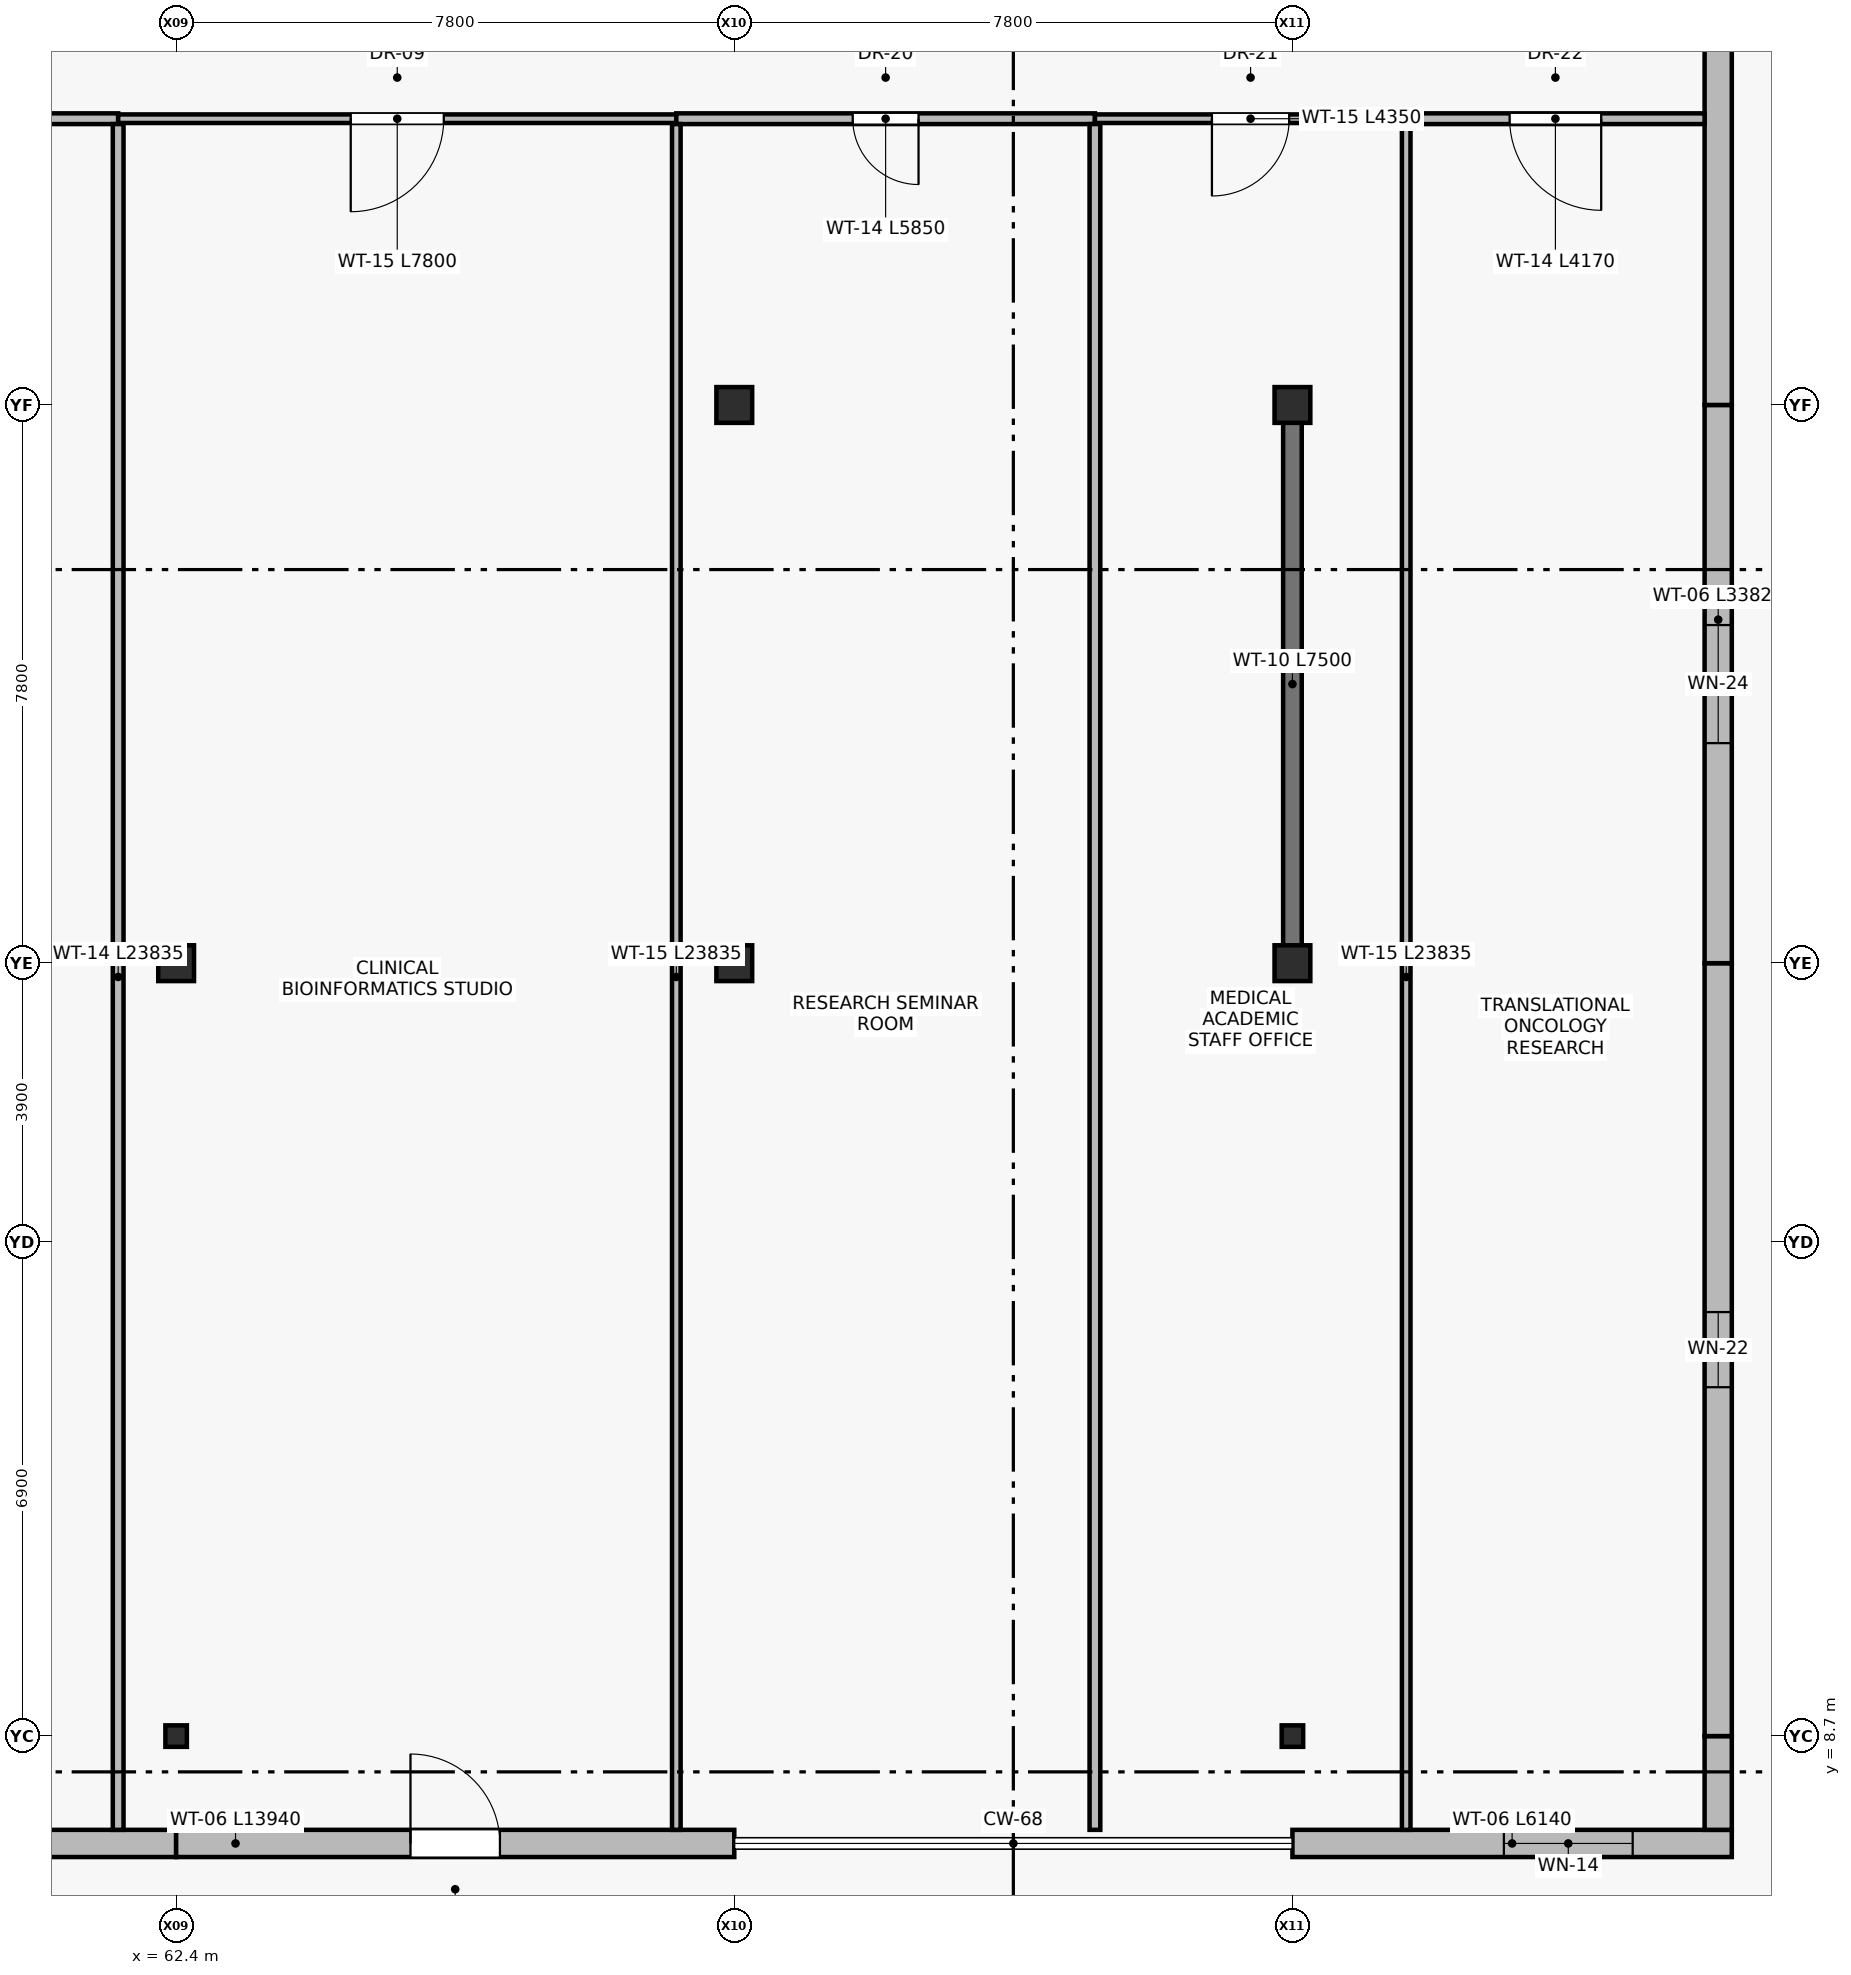
"""IFC4 building model, lengths in metres.
Left out: names, types, materials, properties, quantities, classifications, styles, units other than length and angle.
Written with IfcOpenShell. Run it as: python <this file> out.ifc"""

import sys

from ifc_helpers import new_model, si_unit, direction, frame, frame_2d, origin, origin_2d, place, context, subcontext, project, spatial, rectangle, i_section, extrude, element, fill, save


model = new_model("IFC4")
c1 = context("Model", 3, precision=1e-05, world=origin(), true_north=direction((0.0, 1.0)))
c2 = subcontext(c1, "Body", "Model", "MODEL_VIEW")
j1 = project(units=[si_unit("LENGTHUNIT", "METRE"), si_unit("PLANEANGLEUNIT", "RADIAN")], contexts=[c1])
p1 = place(None, origin())
s1 = spatial("IfcSite", under=j1, at=p1, CompositionType="ELEMENT")
p2 = place(p1, origin())
s2 = spatial("IfcBuilding", under=s1, at=p2, CompositionType="ELEMENT")
p3 = place(p2, frame((0.0, 0.0, 14.1)))
s3 = spatial("IfcBuildingStorey", under=s2, at=p3, CompositionType="ELEMENT", Elevation=14.1)
for number, where, z_axis, x_axis in (
    (1, (62.4, 19.5, 0.0), (0.0, 0.0, 1.0), (1.0, 0.0, 0.0)),
    (2, (70.2, 19.5, 0.0), (0.0, 0.0, 1.0), (1.0, 0.0, 0.0)),
    (3, (70.2, 27.3, 0.0), (0.0, 0.0, 1.0), (1.0, 0.0, 0.0)),
    (4, (78.0, 19.5, 0.0), (0.0, 0.0, 1.0), (1.0, 0.0, 0.0)),
    (5, (78.0, 27.3, 0.0), (0.0, 0.0, 1.0), (1.0, 0.0, 0.0)),
):
    element("IfcColumn", number, at=place(p3, frame(where, z_axis=z_axis, x_axis=x_axis)), inside=s3, PredefinedType="COLUMN", context=c2, shape_type="SweptSolid", body=[
        extrude(rectangle(XDim=0.5, YDim=0.5, at=origin_2d()), origin(), (0.0, 0.0, 1.0), 4.5),
    ])
for number, where, z_axis, x_axis in (
    (6, (62.4, 8.7, 0.0), (0.0, 0.0, 1.0), (1.0, 0.0, 0.0)),
    (7, (78.0, 8.7, 0.0), (0.0, 0.0, 1.0), (1.0, 0.0, 0.0)),
):
    element("IfcColumn", number, at=place(p3, frame(where, z_axis=z_axis, x_axis=x_axis)), inside=s3, PredefinedType="COLUMN", context=c2, shape_type="SweptSolid", body=[
        extrude(i_section(OverallWidth=0.3, OverallDepth=0.3, WebThickness=0.011, FlangeThickness=0.019, at=origin_2d()), origin(), (0.0, 0.0, 1.0), 4.5),
    ])
p4 = place(p3, frame((62.4, 7.2, 0.0), z_axis=(0.0, 0.0, 1.0), x_axis=(-1.0, 0.0, 0.0)))
e8 = element("IfcWall", 8, at=p4, inside=s3, PredefinedType="STANDARD", context=c2, shape_type="SweptSolid", body=[
    extrude(rectangle(XDim=6.14, YDim=0.38, at=frame_2d((3.07, 0.0))), origin(), (0.0, 0.0, 1.0), 4.24),
])
p5 = place(p4, frame((2.715, 0.0, 0.9)))
e9 = element("IfcOpeningElement", 9, at=p5, cuts=e8, PredefinedType="OPENING", context=c2, shape_type="SweptSolid", body=[
    extrude(rectangle(XDim=1.5, YDim=2.2, at=frame_2d((0.75, 1.1))), frame((0.0, 0.2, 0.0), z_axis=(0.0, -1.0, 0.0), x_axis=(1.0, 0.0, 0.0)), (0.0, 0.0, 1.0), 0.4),
])
p6 = place(p3, frame((70.2, 7.2, 0.0), z_axis=(0.0, 0.0, 1.0), x_axis=(-1.0, 0.0, 0.0)))
e10 = element("IfcWall", 10, at=p6, inside=s3, PredefinedType="STANDARD", context=c2, shape_type="SweptSolid", body=[
    extrude(rectangle(XDim=7.8, YDim=0.38, at=frame_2d((3.9, 0.0))), origin(), (0.0, 0.0, 1.0), 4.24),
])
p7 = place(p6, frame((3.275, 0.0, 0.0)))
e11 = element("IfcOpeningElement", 11, at=p7, cuts=e10, PredefinedType="OPENING", context=c2, shape_type="SweptSolid", body=[
    extrude(rectangle(XDim=1.25, YDim=2.2, at=frame_2d((0.625, 1.1))), frame((0.0, 0.2, 0.0), z_axis=(0.0, -1.0, 0.0), x_axis=(1.0, 0.0, 0.0)), (0.0, 0.0, 1.0), 0.4),
])
p8 = place(p3, frame((84.14, 7.2, 0.0), z_axis=(0.0, 0.0, 1.0), x_axis=(-1.0, 0.0, 0.0)))
e12 = element("IfcWall", 12, at=p8, inside=s3, PredefinedType="STANDARD", context=c2, shape_type="SweptSolid", body=[
    extrude(rectangle(XDim=6.14, YDim=0.38, at=frame_2d((3.07, 0.0))), origin(), (0.0, 0.0, 1.0), 4.24),
])
p9 = place(p8, frame((1.385, 0.0, 0.9)))
e13 = element("IfcOpeningElement", 13, at=p9, cuts=e12, PredefinedType="OPENING", context=c2, shape_type="SweptSolid", body=[
    extrude(rectangle(XDim=1.8, YDim=2.2, at=frame_2d((0.9, 1.1))), frame((0.0, 0.2, 0.0), z_axis=(0.0, -1.0, 0.0), x_axis=(1.0, 0.0, 0.0)), (0.0, 0.0, 1.0), 0.4),
])
p10 = place(p3, frame((83.95, 8.7, 0.0), z_axis=(0.0, 0.0, 1.0), x_axis=(0.0, -1.0, 0.0)))
e14 = element("IfcWall", 14, at=p10, inside=s3, PredefinedType="STANDARD", context=c2, shape_type="SweptSolid", body=[
    extrude(rectangle(XDim=1.31, YDim=0.38, at=frame_2d((0.655, 0.0))), origin(), (0.0, 0.0, 1.0), 4.24),
])
p11 = place(p3, frame((83.95, 19.5, 0.0), z_axis=(0.0, 0.0, 1.0), x_axis=(0.0, -1.0, 0.0)))
e15 = element("IfcWall", 15, at=p11, inside=s3, PredefinedType="STANDARD", context=c2, shape_type="SweptSolid", body=[
    extrude(rectangle(XDim=10.8, YDim=0.38, at=frame_2d((5.4, 0.0))), origin(), (0.0, 0.0, 1.0), 4.24),
])
p12 = place(p11, frame((4.875, 0.0, 0.9)))
e16 = element("IfcOpeningElement", 16, at=p12, cuts=e15, PredefinedType="OPENING", context=c2, shape_type="SweptSolid", body=[
    extrude(rectangle(XDim=1.05, YDim=2.05, at=frame_2d((0.525, 1.025))), frame((0.0, 0.2, 0.0), z_axis=(0.0, -1.0, 0.0), x_axis=(1.0, 0.0, 0.0)), (0.0, 0.0, 1.0), 0.4),
])
p13 = place(p3, frame((83.95, 27.3, 0.0), z_axis=(0.0, 0.0, 1.0), x_axis=(0.0, -1.0, 0.0)))
e17 = element("IfcWall", 17, at=p13, inside=s3, PredefinedType="STANDARD", context=c2, shape_type="SweptSolid", body=[
    extrude(rectangle(XDim=7.8, YDim=0.38, at=frame_2d((3.9, 0.0))), origin(), (0.0, 0.0, 1.0), 4.24),
])
p14 = place(p13, frame((3.075, 0.0, 0.9)))
e18 = element("IfcOpeningElement", 18, at=p14, cuts=e17, PredefinedType="OPENING", context=c2, shape_type="SweptSolid", body=[
    extrude(rectangle(XDim=1.65, YDim=1.5, at=frame_2d((0.825, 0.75))), frame((0.0, 0.2, 0.0), z_axis=(0.0, -1.0, 0.0), x_axis=(1.0, 0.0, 0.0)), (0.0, 0.0, 1.0), 0.4),
])
p15 = place(p3, frame((83.95, 35.1, 0.0), z_axis=(0.0, 0.0, 1.0), x_axis=(0.0, -1.0, 0.0)))
e19 = element("IfcWall", 19, at=p15, inside=s3, PredefinedType="STANDARD", context=c2, shape_type="SweptSolid", body=[
    extrude(rectangle(XDim=7.8, YDim=0.38, at=frame_2d((3.9, 0.0))), origin(), (0.0, 0.0, 1.0), 4.24),
])
p16 = place(p15, frame((1.525, 0.0, 0.0)))
e20 = element("IfcOpeningElement", 20, at=p16, cuts=e19, PredefinedType="OPENING", context=c2, shape_type="SweptSolid", body=[
    extrude(rectangle(XDim=1.25, YDim=2.2, at=frame_2d((0.625, 1.1))), frame((0.0, 0.2, 0.0), z_axis=(0.0, -1.0, 0.0), x_axis=(1.0, 0.0, 0.0)), (0.0, 0.0, 1.0), 0.4),
])
p17 = place(p3, frame((78.0, 19.65, 0.0), z_axis=(0.0, 0.0, 1.0), x_axis=(0.0, 1.0, 0.0)))
e21 = element("IfcWall", 21, at=p17, inside=s3, PredefinedType="SHEAR", context=c2, shape_type="SweptSolid", body=[
    extrude(rectangle(XDim=7.5, YDim=0.26, at=frame_2d((3.75, 0.0))), origin(), (0.0, 0.0, 1.0), 4.24),
])
p18 = place(p3, frame((61.59, 31.3, 0.0), z_axis=(0.0, 0.0, 1.0), x_axis=(-1.0, 0.0, 0.0)))
e22 = element("IfcWall", 22, at=p18, inside=s3, PredefinedType="PARTITIONING", context=c2, shape_type="SweptSolid", body=[
    extrude(rectangle(XDim=4.95, YDim=0.15, at=frame_2d((2.475, 0.0))), origin(), (0.0, 0.0, 1.0), 4.24),
])
p19 = place(p18, frame((1.875, 0.0, 0.0)))
e23 = element("IfcOpeningElement", 23, at=p19, cuts=e22, PredefinedType="OPENING", context=c2, shape_type="SweptSolid", body=[
    extrude(rectangle(XDim=1.2, YDim=2.2, at=frame_2d((0.6, 1.1))), frame((0.0, 0.085, 0.0), z_axis=(0.0, -1.0, 0.0), x_axis=(1.0, 0.0, 0.0)), (0.0, 0.0, 1.0), 0.17),
])
p20 = place(p3, frame((69.39, 31.3, 0.0), z_axis=(0.0, 0.0, 1.0), x_axis=(-1.0, 0.0, 0.0)))
e24 = element("IfcWall", 24, at=p20, inside=s3, PredefinedType="PARTITIONING", context=c2, shape_type="SweptSolid", body=[
    extrude(rectangle(XDim=7.8, YDim=0.12, at=frame_2d((3.9, 0.0))), origin(), (0.0, 0.0, 1.0), 4.24),
])
p21 = place(p20, frame((3.25, 0.0, 0.0)))
e25 = element("IfcOpeningElement", 25, at=p21, cuts=e24, PredefinedType="OPENING", context=c2, shape_type="SweptSolid", body=[
    extrude(rectangle(XDim=1.3, YDim=2.2, at=frame_2d((0.65, 1.1))), frame((0.0, 0.07, 0.0), z_axis=(0.0, -1.0, 0.0), x_axis=(1.0, 0.0, 0.0)), (0.0, 0.0, 1.0), 0.14),
])
p22 = place(p3, frame((75.24, 31.3, 0.0), z_axis=(0.0, 0.0, 1.0), x_axis=(-1.0, 0.0, 0.0)))
e26 = element("IfcWall", 26, at=p22, inside=s3, PredefinedType="PARTITIONING", context=c2, shape_type="SweptSolid", body=[
    extrude(rectangle(XDim=5.85, YDim=0.15, at=frame_2d((2.925, 0.0))), origin(), (0.0, 0.0, 1.0), 4.24),
])
p23 = place(p22, frame((2.465, 0.0, 0.0)))
e27 = element("IfcOpeningElement", 27, at=p23, cuts=e26, PredefinedType="OPENING", context=c2, shape_type="SweptSolid", body=[
    extrude(rectangle(XDim=0.92, YDim=2.15, at=frame_2d((0.46, 1.075))), frame((0.0, 0.085, 0.0), z_axis=(0.0, -1.0, 0.0), x_axis=(1.0, 0.0, 0.0)), (0.0, 0.0, 1.0), 0.17),
])
p24 = place(p3, frame((79.59, 31.3, 0.0), z_axis=(0.0, 0.0, 1.0), x_axis=(-1.0, 0.0, 0.0)))
e28 = element("IfcWall", 28, at=p24, inside=s3, PredefinedType="PARTITIONING", context=c2, shape_type="SweptSolid", body=[
    extrude(rectangle(XDim=4.35, YDim=0.12, at=frame_2d((2.175, 0.0))), origin(), (0.0, 0.0, 1.0), 4.24),
])
p25 = place(p24, frame((1.635, 0.0, 0.0)))
e29 = element("IfcOpeningElement", 29, at=p25, cuts=e28, PredefinedType="OPENING", context=c2, shape_type="SweptSolid", body=[
    extrude(rectangle(XDim=1.08, YDim=2.2, at=frame_2d((0.54, 1.1))), frame((0.0, 0.07, 0.0), z_axis=(0.0, -1.0, 0.0), x_axis=(1.0, 0.0, 0.0)), (0.0, 0.0, 1.0), 0.14),
])
p26 = place(p3, frame((83.76, 31.3, 0.0), z_axis=(0.0, 0.0, 1.0), x_axis=(-1.0, 0.0, 0.0)))
e30 = element("IfcWall", 30, at=p26, inside=s3, PredefinedType="PARTITIONING", context=c2, shape_type="SweptSolid", body=[
    extrude(rectangle(XDim=4.17, YDim=0.15, at=frame_2d((2.085, 0.0))), origin(), (0.0, 0.0, 1.0), 4.24),
])
p27 = place(p26, frame((1.445, 0.0, 0.0)))
e31 = element("IfcOpeningElement", 31, at=p27, cuts=e30, PredefinedType="OPENING", context=c2, shape_type="SweptSolid", body=[
    extrude(rectangle(XDim=1.28, YDim=2.25, at=frame_2d((0.64, 1.125))), frame((0.0, 0.085, 0.0), z_axis=(0.0, -1.0, 0.0), x_axis=(1.0, 0.0, 0.0)), (0.0, 0.0, 1.0), 0.17),
])
p28 = place(p3, frame((61.59, 7.39, 0.0), z_axis=(0.0, 0.0, 1.0), x_axis=(0.0, 1.0, 0.0)))
e32 = element("IfcWall", 32, at=p28, inside=s3, PredefinedType="PARTITIONING", context=c2, shape_type="SweptSolid", body=[
    extrude(rectangle(XDim=23.835, YDim=0.15, at=frame_2d((11.917, 0.0))), origin(), (0.0, 0.0, 1.0), 4.24),
])
p29 = place(p3, frame((69.39, 7.39, 0.0), z_axis=(0.0, 0.0, 1.0), x_axis=(0.0, 1.0, 0.0)))
e33 = element("IfcWall", 33, at=p29, inside=s3, PredefinedType="PARTITIONING", context=c2, shape_type="SweptSolid", body=[
    extrude(rectangle(XDim=23.835, YDim=0.12, at=frame_2d((11.917, 0.0))), origin(), (0.0, 0.0, 1.0), 4.24),
])
p30 = place(p3, frame((75.24, 7.39, 0.0), z_axis=(0.0, 0.0, 1.0), x_axis=(0.0, 1.0, 0.0)))
e34 = element("IfcWall", 34, at=p30, inside=s3, PredefinedType="PARTITIONING", context=c2, shape_type="SweptSolid", body=[
    extrude(rectangle(XDim=23.835, YDim=0.15, at=frame_2d((11.917, 0.0))), origin(), (0.0, 0.0, 1.0), 4.24),
])
p31 = place(p3, frame((79.59, 7.39, 0.0), z_axis=(0.0, 0.0, 1.0), x_axis=(0.0, 1.0, 0.0)))
e35 = element("IfcWall", 35, at=p31, inside=s3, PredefinedType="PARTITIONING", context=c2, shape_type="SweptSolid", body=[
    extrude(rectangle(XDim=23.835, YDim=0.12, at=frame_2d((11.917, 0.0))), origin(), (0.0, 0.0, 1.0), 4.24),
])
p32 = place(p7, frame((1.25, 0.0, 0.0), z_axis=(0.0, 0.0, 1.0), x_axis=(-1.0, 0.0, 0.0)))
e36 = element("IfcDoor", 36, at=p32, inside=s3, OperationType="SINGLE_SWING_RIGHT", PredefinedType="DOOR", context=c2, shape_type="SweptSolid", body=[
    extrude(rectangle(XDim=1.25, YDim=2.2, at=frame_2d((0.625, 1.1))), frame((0.0, 0.025, 0.0), z_axis=(0.0, -1.0, 0.0), x_axis=(1.0, 0.0, 0.0)), (0.0, 0.0, 1.0), 0.05),
])
fill(e11, e36)
p33 = place(p9, origin())
e37 = element("IfcWindow", 37, at=p33, inside=s3, PartitioningType="SINGLE_PANEL", PredefinedType="WINDOW", context=c2, shape_type="SweptSolid", body=[
    extrude(rectangle(XDim=1.8, YDim=2.2, at=frame_2d((0.9, 1.1))), frame((0.0, 0.03, 0.0), z_axis=(0.0, -1.0, 0.0), x_axis=(1.0, 0.0, 0.0)), (0.0, 0.0, 1.0), 0.06),
])
fill(e13, e37)
p34 = place(p12, origin())
e38 = element("IfcWindow", 38, at=p34, inside=s3, PartitioningType="SINGLE_PANEL", PredefinedType="WINDOW", context=c2, shape_type="SweptSolid", body=[
    extrude(rectangle(XDim=1.05, YDim=2.05, at=frame_2d((0.525, 1.025))), frame((0.0, 0.03, 0.0), z_axis=(0.0, -1.0, 0.0), x_axis=(1.0, 0.0, 0.0)), (0.0, 0.0, 1.0), 0.06),
])
fill(e16, e38)
p35 = place(p14, origin())
e39 = element("IfcWindow", 39, at=p35, inside=s3, PartitioningType="SINGLE_PANEL", PredefinedType="WINDOW", context=c2, shape_type="SweptSolid", body=[
    extrude(rectangle(XDim=1.65, YDim=1.5, at=frame_2d((0.825, 0.75))), frame((0.0, 0.03, 0.0), z_axis=(0.0, -1.0, 0.0), x_axis=(1.0, 0.0, 0.0)), (0.0, 0.0, 1.0), 0.06),
])
fill(e18, e39)
p36 = place(p21, origin())
e40 = element("IfcDoor", 40, at=p36, inside=s3, OperationType="SINGLE_SWING_RIGHT", PredefinedType="DOOR", context=c2, shape_type="SweptSolid", body=[
    extrude(rectangle(XDim=1.3, YDim=2.2, at=frame_2d((0.65, 1.1))), frame((0.0, 0.025, 0.0), z_axis=(0.0, -1.0, 0.0), x_axis=(1.0, 0.0, 0.0)), (0.0, 0.0, 1.0), 0.05),
])
fill(e25, e40)
p37 = place(p23, origin())
e41 = element("IfcDoor", 41, at=p37, inside=s3, OperationType="SINGLE_SWING_LEFT", PredefinedType="DOOR", context=c2, shape_type="SweptSolid", body=[
    extrude(rectangle(XDim=0.92, YDim=2.15, at=frame_2d((0.46, 1.075))), frame((0.0, 0.025, 0.0), z_axis=(0.0, -1.0, 0.0), x_axis=(1.0, 0.0, 0.0)), (0.0, 0.0, 1.0), 0.05),
])
fill(e27, e41)
p38 = place(p25, origin())
e42 = element("IfcDoor", 42, at=p38, inside=s3, OperationType="SINGLE_SWING_RIGHT", PredefinedType="DOOR", context=c2, shape_type="SweptSolid", body=[
    extrude(rectangle(XDim=1.08, YDim=2.2, at=frame_2d((0.54, 1.1))), frame((0.0, 0.025, 0.0), z_axis=(0.0, -1.0, 0.0), x_axis=(1.0, 0.0, 0.0)), (0.0, 0.0, 1.0), 0.05),
])
fill(e29, e42)
p39 = place(p27, origin())
e43 = element("IfcDoor", 43, at=p39, inside=s3, OperationType="SINGLE_SWING_LEFT", PredefinedType="DOOR", context=c2, shape_type="SweptSolid", body=[
    extrude(rectangle(XDim=1.28, YDim=2.25, at=frame_2d((0.64, 1.125))), frame((0.0, 0.025, 0.0), z_axis=(0.0, -1.0, 0.0), x_axis=(1.0, 0.0, 0.0)), (0.0, 0.0, 1.0), 0.05),
])
fill(e31, e43)
save(model, sys.argv[1])
